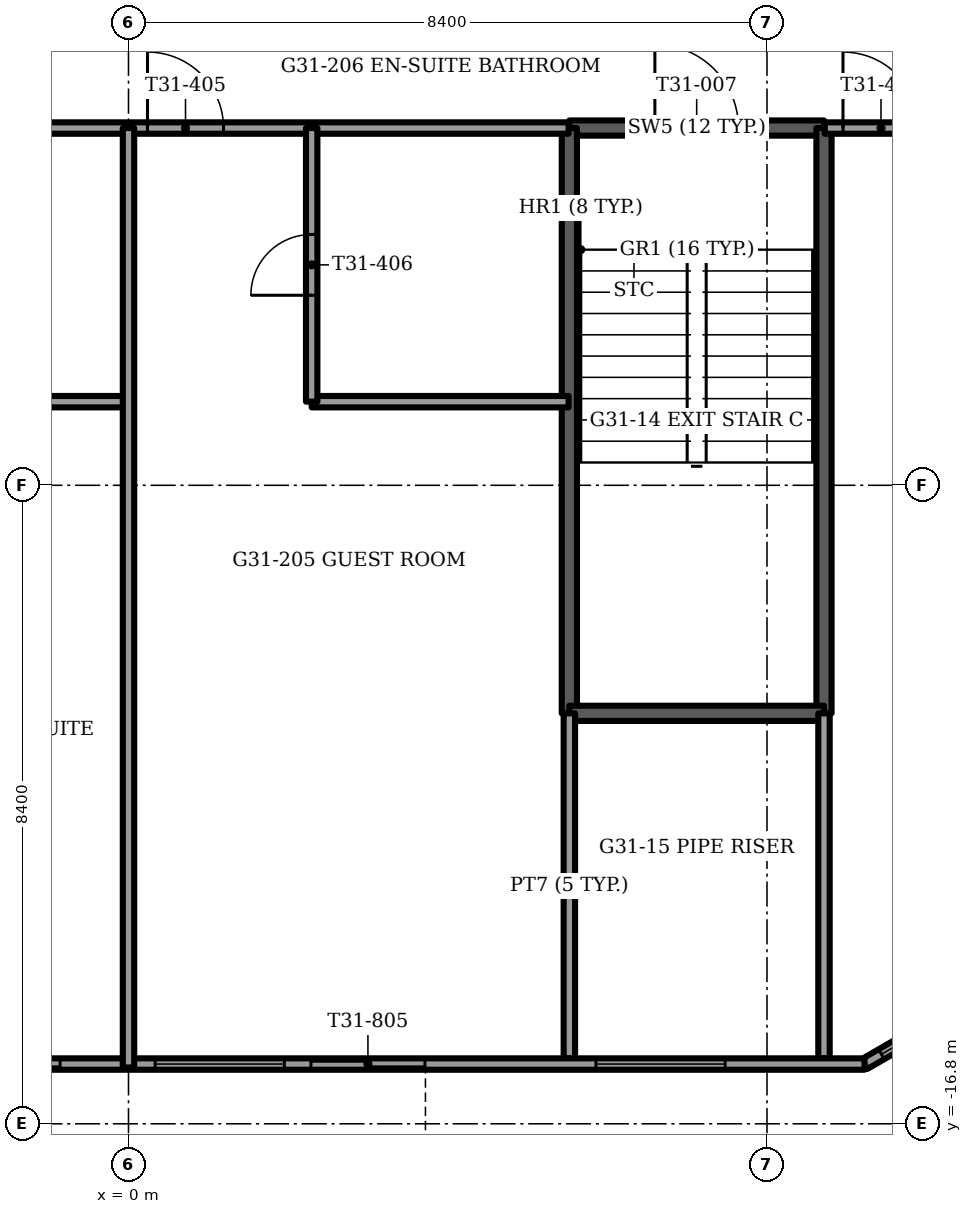
"""IFC4 building model, lengths in metres.
Left out: names, types, materials, properties, quantities, classifications, styles, units other than length and angle.
Written with IfcOpenShell. Run it as: python <this file> out.ifc"""

import sys

from ifc_helpers import new_model, si_unit, direction, frame, frame_2d, origin, place, context, subcontext, project, spatial, rectangle, extrude, element, fill, save


model = new_model("IFC4")
c1 = context("Model", 3, precision=1e-05, world=origin(), true_north=direction((0.0, 1.0)))
c2 = subcontext(c1, "Body", "Model", "MODEL_VIEW")
j1 = project(units=[si_unit("LENGTHUNIT", "METRE"), si_unit("PLANEANGLEUNIT", "RADIAN")], contexts=[c1])
p1 = place(None, origin())
s1 = spatial("IfcSite", under=j1, at=p1, CompositionType="ELEMENT")
p2 = place(p1, origin())
s2 = spatial("IfcBuilding", under=s1, at=p2, CompositionType="ELEMENT")
p3 = place(p2, frame((0.0, 0.0, 127.25)))
s3 = spatial("IfcBuildingStorey", under=s2, at=p3, CompositionType="ELEMENT", Elevation=127.25)
p4 = place(p3, frame((-9.683, -16.014, 0.0), z_axis=(0.0, 0.0, 1.0), x_axis=(1.0, 0.0, 0.0)))
e1 = element("IfcWall", 1, at=p4, inside=s3, PredefinedType="SOLIDWALL", context=c2, shape_type="SweptSolid", body=[
    extrude(rectangle(XDim=19.365, YDim=0.15, at=frame_2d((9.683, 0.0))), origin(), (0.0, 0.0, 1.0), 3.45),
])
p5 = place(p4, frame((1.583, 0.0, 0.15)))
e2 = element("IfcOpeningElement", 2, at=p5, cuts=e1, PredefinedType="OPENING", context=c2, shape_type="SweptSolid", body=[
    extrude(rectangle(XDim=1.7, YDim=2.85, at=frame_2d((0.85, 1.425))), frame((0.0, 0.075, 0.0), z_axis=(0.0, -1.0, 0.0), x_axis=(1.0, 0.0, 0.0)), (0.0, 0.0, 1.0), 0.15),
])
p6 = place(p4, frame((5.833, 0.0, 0.15)))
e3 = element("IfcOpeningElement", 3, at=p6, cuts=e1, PredefinedType="OPENING", context=c2, shape_type="SweptSolid", body=[
    extrude(rectangle(XDim=0.9, YDim=2.85, at=frame_2d((0.45, 1.425))), frame((0.0, 0.075, 0.0), z_axis=(0.0, -1.0, 0.0), x_axis=(1.0, 0.0, 0.0)), (0.0, 0.0, 1.0), 0.15),
])
p7 = place(p4, frame((7.283, 0.0, 0.0)))
e4 = element("IfcOpeningElement", 4, at=p7, cuts=e1, PredefinedType="OPENING", context=c2, shape_type="SweptSolid", body=[
    extrude(rectangle(XDim=1.5, YDim=2.4, at=frame_2d((0.75, 1.2))), frame((0.0, 0.075, 0.0), z_axis=(0.0, -1.0, 0.0), x_axis=(1.0, 0.0, 0.0)), (0.0, 0.0, 1.0), 0.15),
])
p8 = place(p4, frame((10.033, 0.0, 0.15)))
e5 = element("IfcOpeningElement", 5, at=p8, cuts=e1, PredefinedType="OPENING", context=c2, shape_type="SweptSolid", body=[
    extrude(rectangle(XDim=1.7, YDim=2.85, at=frame_2d((0.85, 1.425))), frame((0.0, 0.075, 0.0), z_axis=(0.0, -1.0, 0.0), x_axis=(1.0, 0.0, 0.0)), (0.0, 0.0, 1.0), 0.15),
])
p9 = place(p4, frame((12.083, 0.0, 0.0)))
e6 = element("IfcOpeningElement", 6, at=p9, cuts=e1, PredefinedType="OPENING", context=c2, shape_type="SweptSolid", body=[
    extrude(rectangle(XDim=1.5, YDim=2.4, at=frame_2d((0.75, 1.2))), frame((0.0, 0.075, 0.0), z_axis=(0.0, -1.0, 0.0), x_axis=(1.0, 0.0, 0.0)), (0.0, 0.0, 1.0), 0.15),
])
p10 = place(p4, frame((15.833, 0.0, 0.15)))
e7 = element("IfcOpeningElement", 7, at=p10, cuts=e1, PredefinedType="OPENING", context=c2, shape_type="SweptSolid", body=[
    extrude(rectangle(XDim=1.7, YDim=2.85, at=frame_2d((0.85, 1.425))), frame((0.0, 0.075, 0.0), z_axis=(0.0, -1.0, 0.0), x_axis=(1.0, 0.0, 0.0)), (0.0, 0.0, 1.0), 0.15),
])
p11 = place(p3, frame((9.683, -16.014, 0.0), z_axis=(0.0, 0.0, 1.0), x_axis=(0.866048165231, 0.499960573946, 0.0)))
e8 = element("IfcWall", 8, at=p11, inside=s3, PredefinedType="SOLIDWALL", context=c2, shape_type="SweptSolid", body=[
    extrude(rectangle(XDim=1.065, YDim=0.15, at=frame_2d((0.532, 0.0))), origin(), (0.0, 0.0, 1.0), 3.45),
])
p12 = place(p11, frame((0.258, 0.0, 0.15)))
e9 = element("IfcOpeningElement", 9, at=p12, cuts=e8, PredefinedType="OPENING", context=c2, shape_type="SweptSolid", body=[
    extrude(rectangle(XDim=0.55, YDim=2.85, at=frame_2d((0.275, 1.425))), frame((0.0, 0.075, 0.0), z_axis=(0.0, -1.0, 0.0), x_axis=(1.0, 0.0, 0.0)), (0.0, 0.0, 1.0), 0.15),
])
p13 = place(p3, frame((5.8, -3.7, -0.3), z_axis=(0.0, 0.0, 1.0), x_axis=(1.0, 0.0, 0.0)))
e10 = element("IfcWall", 10, at=p13, inside=s3, PredefinedType="SOLIDWALL", context=c2, shape_type="SweptSolid", body=[
    extrude(rectangle(XDim=3.35, YDim=0.2, at=frame_2d((1.675, 0.0))), origin(), (0.0, 0.0, 1.0), 3.75),
])
p14 = place(p13, frame((1.125, 0.0, 0.0)))
e11 = element("IfcOpeningElement", 11, at=p14, cuts=e10, PredefinedType="OPENING", context=c2, shape_type="SweptSolid", body=[
    extrude(rectangle(XDim=1.1, YDim=2.1, at=frame_2d((0.55, 1.05))), frame((0.0, 0.1, 0.0), z_axis=(0.0, -1.0, 0.0), x_axis=(1.0, 0.0, 0.0)), (0.0, 0.0, 1.0), 0.2),
])
for number, where, z_axis, x_axis in (
    (12, (5.8, -3.7, -0.3), (0.0, 0.0, 1.0), (0.0, -1.0, 0.0)),
    (13, (9.15, -3.7, -0.3), (0.0, 0.0, 1.0), (0.0, -1.0, 0.0)),
):
    element("IfcWall", number, at=place(p3, frame(where, z_axis=z_axis, x_axis=x_axis)), inside=s3, PredefinedType="SOLIDWALL", context=c2, shape_type="SweptSolid", body=[
        extrude(rectangle(XDim=7.7, YDim=0.2, at=frame_2d((3.85, 0.0))), origin(), (0.0, 0.0, 1.0), 3.75),
    ])
p15 = place(p3, frame((5.8, -11.4, -0.3), z_axis=(0.0, 0.0, 1.0), x_axis=(1.0, 0.0, 0.0)))
e14 = element("IfcWall", 14, at=p15, inside=s3, PredefinedType="SOLIDWALL", context=c2, shape_type="SweptSolid", body=[
    extrude(rectangle(XDim=3.35, YDim=0.2, at=frame_2d((1.675, 0.0))), origin(), (0.0, 0.0, 1.0), 3.75),
])
for number, where, z_axis, x_axis in (
    (15, (5.8, -11.4, 0.0), (0.0, 0.0, 1.0), (0.0, -1.0, 0.0)),
    (16, (9.15, -11.4, 0.0), (0.0, 0.0, 1.0), (0.0, -1.0, 0.0)),
):
    element("IfcWall", number, at=place(p3, frame(where, z_axis=z_axis, x_axis=x_axis)), inside=s3, PredefinedType="PARTITIONING", context=c2, shape_type="SweptSolid", body=[
        extrude(rectangle(XDim=4.539, YDim=0.15, at=frame_2d((2.27, 0.0))), origin(), (0.0, 0.0, 1.0), 3.45),
    ])
p16 = place(p3, frame((-2.8, -7.3, 0.0), z_axis=(0.0, 0.0, 1.0), x_axis=(1.0, 0.0, 0.0)))
e17 = element("IfcWall", 17, at=p16, inside=s3, PredefinedType="PARTITIONING", context=c2, shape_type="SweptSolid", body=[
    extrude(rectangle(XDim=2.8, YDim=0.15, at=frame_2d((1.4, 0.0))), origin(), (0.0, 0.0, 1.0), 3.45),
])
p17 = place(p3, frame((2.41, -7.3, 0.0), z_axis=(0.0, 0.0, 1.0), x_axis=(1.0, 0.0, 0.0)))
e18 = element("IfcWall", 18, at=p17, inside=s3, PredefinedType="PARTITIONING", context=c2, shape_type="SweptSolid", body=[
    extrude(rectangle(XDim=3.38, YDim=0.15, at=frame_2d((1.69, 0.0))), origin(), (0.0, 0.0, 1.0), 3.45),
])
p18 = place(p3, frame((-5.79, -3.7, 0.0), z_axis=(0.0, 0.0, 1.0), x_axis=(1.0, 0.0, 0.0)))
e19 = element("IfcWall", 19, at=p18, inside=s3, PredefinedType="PARTITIONING", context=c2, shape_type="SweptSolid", body=[
    extrude(rectangle(XDim=11.58, YDim=0.15, at=frame_2d((5.79, 0.0))), origin(), (0.0, 0.0, 1.0), 3.45),
])
p19 = place(p18, frame((0.24, 0.0, 0.0)))
e20 = element("IfcOpeningElement", 20, at=p19, cuts=e19, PredefinedType="OPENING", context=c2, shape_type="SweptSolid", body=[
    extrude(rectangle(XDim=1.0, YDim=2.1, at=frame_2d((0.5, 1.05))), frame((0.0, 0.075, 0.0), z_axis=(0.0, -1.0, 0.0), x_axis=(1.0, 0.0, 0.0)), (0.0, 0.0, 1.0), 0.15),
])
p20 = place(p18, frame((6.04, 0.0, 0.0)))
e21 = element("IfcOpeningElement", 21, at=p20, cuts=e19, PredefinedType="OPENING", context=c2, shape_type="SweptSolid", body=[
    extrude(rectangle(XDim=1.0, YDim=2.1, at=frame_2d((0.5, 1.05))), frame((0.0, 0.075, 0.0), z_axis=(0.0, -1.0, 0.0), x_axis=(1.0, 0.0, 0.0)), (0.0, 0.0, 1.0), 0.15),
])
p21 = place(p3, frame((9.16, -3.7, 0.0), z_axis=(0.0, 0.0, 1.0), x_axis=(1.0, 0.0, 0.0)))
e22 = element("IfcWall", 22, at=p21, inside=s3, PredefinedType="PARTITIONING", context=c2, shape_type="SweptSolid", body=[
    extrude(rectangle(XDim=8.299, YDim=0.15, at=frame_2d((4.149, 0.0))), origin(), (0.0, 0.0, 1.0), 3.45),
])
p22 = place(p21, frame((0.24, 0.0, 0.0)))
e23 = element("IfcOpeningElement", 23, at=p22, cuts=e22, PredefinedType="OPENING", context=c2, shape_type="SweptSolid", body=[
    extrude(rectangle(XDim=1.0, YDim=2.1, at=frame_2d((0.5, 1.05))), frame((0.0, 0.075, 0.0), z_axis=(0.0, -1.0, 0.0), x_axis=(1.0, 0.0, 0.0)), (0.0, 0.0, 1.0), 0.15),
])
p23 = place(p3, frame((2.41, -7.3, 0.0), z_axis=(0.0, 0.0, 1.0), x_axis=(0.0, 1.0, 0.0)))
e24 = element("IfcWall", 24, at=p23, inside=s3, PredefinedType="PARTITIONING", context=c2, shape_type="SweptSolid", body=[
    extrude(rectangle(XDim=3.6, YDim=0.15, at=frame_2d((1.8, 0.0))), origin(), (0.0, 0.0, 1.0), 3.45),
])
p24 = place(p23, frame((1.4, 0.0, 0.0)))
e25 = element("IfcOpeningElement", 25, at=p24, cuts=e24, PredefinedType="OPENING", context=c2, shape_type="SweptSolid", body=[
    extrude(rectangle(XDim=0.8, YDim=2.1, at=frame_2d((0.4, 1.05))), frame((0.0, 0.075, 0.0), z_axis=(0.0, -1.0, 0.0), x_axis=(1.0, 0.0, 0.0)), (0.0, 0.0, 1.0), 0.15),
])
p25 = place(p3, frame((0.0, -16.059, 0.0), z_axis=(0.0, 0.0, 1.0), x_axis=(0.0, 1.0, 0.0)))
e26 = element("IfcWall", 26, at=p25, inside=s3, PredefinedType="PARTITIONING", context=c2, shape_type="SweptSolid", body=[
    extrude(rectangle(XDim=12.359, YDim=0.15, at=frame_2d((6.18, 0.0))), origin(), (0.0, 0.0, 1.0), 3.45),
])
p26 = place(p7, origin())
e27 = element("IfcDoor", 27, at=p26, inside=s3, OperationType="SLIDING_TO_RIGHT", PredefinedType="DOOR", context=c2, shape_type="SweptSolid", body=[
    extrude(rectangle(XDim=1.5, YDim=2.4, at=frame_2d((0.75, 1.2))), frame((0.0, 0.025, 0.0), z_axis=(0.0, -1.0, 0.0), x_axis=(1.0, 0.0, 0.0)), (0.0, 0.0, 1.0), 0.05),
])
fill(e4, e27)
p27 = place(p8, origin())
e28 = element("IfcWindow", 28, at=p27, inside=s3, PartitioningType="SINGLE_PANEL", PredefinedType="WINDOW", context=c2, shape_type="SweptSolid", body=[
    extrude(rectangle(XDim=1.7, YDim=2.85, at=frame_2d((0.85, 1.425))), frame((0.0, 0.03, 0.0), z_axis=(0.0, -1.0, 0.0), x_axis=(1.0, 0.0, 0.0)), (0.0, 0.0, 1.0), 0.06),
])
fill(e5, e28)
p28 = place(p9, origin())
e29 = element("IfcDoor", 29, at=p28, inside=s3, OperationType="SLIDING_TO_LEFT", PredefinedType="DOOR", context=c2, shape_type="SweptSolid", body=[
    extrude(rectangle(XDim=1.5, YDim=2.4, at=frame_2d((0.75, 1.2))), frame((0.0, 0.025, 0.0), z_axis=(0.0, -1.0, 0.0), x_axis=(1.0, 0.0, 0.0)), (0.0, 0.0, 1.0), 0.05),
])
fill(e6, e29)
p29 = place(p10, origin())
e30 = element("IfcWindow", 30, at=p29, inside=s3, PartitioningType="SINGLE_PANEL", PredefinedType="WINDOW", context=c2, shape_type="SweptSolid", body=[
    extrude(rectangle(XDim=1.7, YDim=2.85, at=frame_2d((0.85, 1.425))), frame((0.0, 0.03, 0.0), z_axis=(0.0, -1.0, 0.0), x_axis=(1.0, 0.0, 0.0)), (0.0, 0.0, 1.0), 0.06),
])
fill(e7, e30)
p30 = place(p12, origin())
e31 = element("IfcWindow", 31, at=p30, inside=s3, PartitioningType="SINGLE_PANEL", PredefinedType="WINDOW", context=c2, shape_type="SweptSolid", body=[
    extrude(rectangle(XDim=0.55, YDim=2.85, at=frame_2d((0.275, 1.425))), frame((0.0, 0.03, 0.0), z_axis=(0.0, -1.0, 0.0), x_axis=(1.0, 0.0, 0.0)), (0.0, 0.0, 1.0), 0.06),
])
fill(e9, e31)
p31 = place(p14, origin())
e32 = element("IfcDoor", 32, at=p31, inside=s3, OperationType="SINGLE_SWING_LEFT", PredefinedType="DOOR", context=c2, shape_type="SweptSolid", body=[
    extrude(rectangle(XDim=1.1, YDim=2.1, at=frame_2d((0.55, 1.05))), frame((0.0, 0.025, 0.0), z_axis=(0.0, -1.0, 0.0), x_axis=(1.0, 0.0, 0.0)), (0.0, 0.0, 1.0), 0.05),
])
fill(e11, e32)
p32 = place(p20, origin())
e33 = element("IfcDoor", 33, at=p32, inside=s3, OperationType="SINGLE_SWING_LEFT", PredefinedType="DOOR", context=c2, shape_type="SweptSolid", body=[
    extrude(rectangle(XDim=1.0, YDim=2.1, at=frame_2d((0.5, 1.05))), frame((0.0, 0.025, 0.0), z_axis=(0.0, -1.0, 0.0), x_axis=(1.0, 0.0, 0.0)), (0.0, 0.0, 1.0), 0.05),
])
fill(e21, e33)
p33 = place(p24, origin())
e34 = element("IfcDoor", 34, at=p33, inside=s3, OperationType="SINGLE_SWING_RIGHT", PredefinedType="DOOR", context=c2, shape_type="SweptSolid", body=[
    extrude(rectangle(XDim=0.8, YDim=2.1, at=frame_2d((0.4, 1.05))), frame((0.0, 0.025, 0.0), z_axis=(0.0, -1.0, 0.0), x_axis=(1.0, 0.0, 0.0)), (0.0, 0.0, 1.0), 0.05),
])
fill(e25, e34)
p34 = place(p22, origin())
e35 = element("IfcDoor", 35, at=p34, inside=s3, OperationType="SINGLE_SWING_LEFT", PredefinedType="DOOR", context=c2, shape_type="SweptSolid", body=[
    extrude(rectangle(XDim=1.0, YDim=2.1, at=frame_2d((0.5, 1.05))), frame((0.0, 0.025, 0.0), z_axis=(0.0, -1.0, 0.0), x_axis=(1.0, 0.0, 0.0)), (0.0, 0.0, 1.0), 0.05),
])
fill(e23, e35)
save(model, sys.argv[1])
